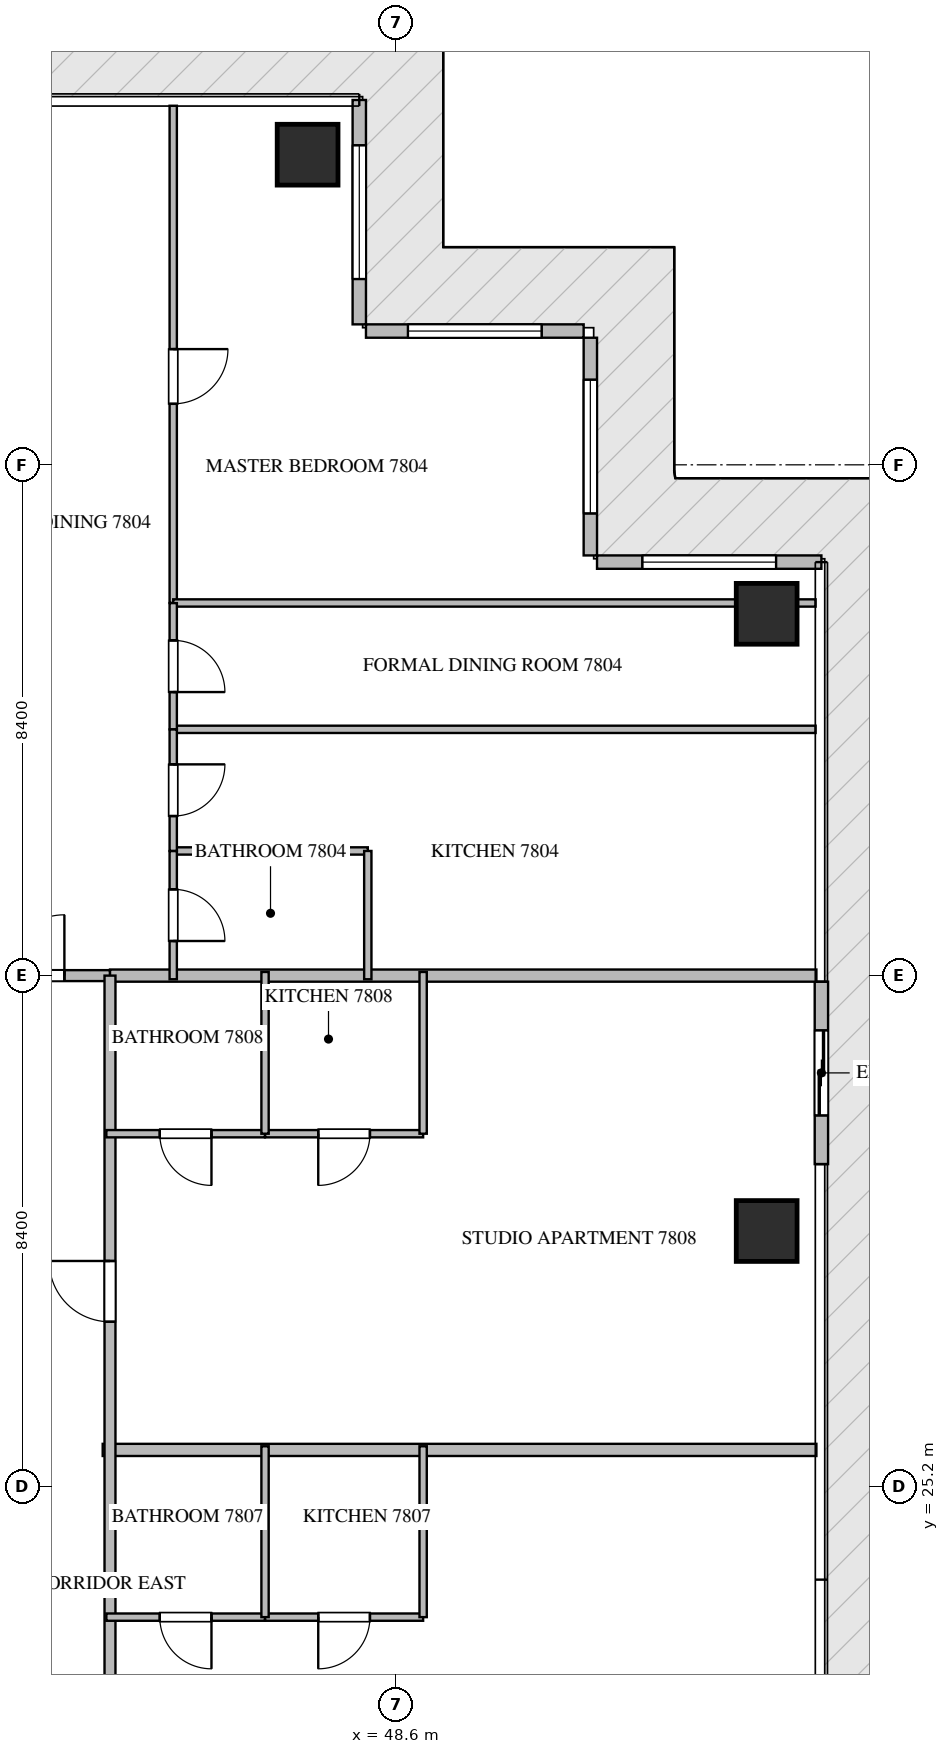
"""IFC4 building model, lengths in metres.
Left out: names, types, materials, properties, quantities, classifications, styles, units other than length and angle.
Written with IfcOpenShell. Run it as: python <this file> out.ifc"""

import sys

from ifc_helpers import new_model, si_unit, direction, frame, frame_2d, origin, origin_2d, place, context, subcontext, project, spatial, rectangle, extrude, source, transform, mapped, element, fill, save


model = new_model("IFC4")
c1 = context("Model", 3, precision=1e-05, world=origin(), true_north=direction((0.0, 1.0)))
c2 = subcontext(c1, "Body", "Model", "MODEL_VIEW")
j1 = project(units=[si_unit("LENGTHUNIT", "METRE"), si_unit("PLANEANGLEUNIT", "RADIAN")], contexts=[c1])
p1 = place(None, origin())
s1 = spatial("IfcSite", under=j1, at=p1, CompositionType="ELEMENT")
p2 = place(p1, origin())
s2 = spatial("IfcBuilding", under=s1, at=p2, CompositionType="ELEMENT")
p3 = place(p2, frame((0.0, 0.0, 313.7)))
s3 = spatial("IfcBuildingStorey", under=s2, at=p3, CompositionType="ELEMENT", Elevation=313.7)
m1 = source(origin(), c2, "Body", "SweptSolid", [
    extrude(rectangle(XDim=1.0, YDim=1.0, at=origin_2d()), origin(), (0.0, 0.0, 1.0), 4.05),
])
for number, where, z_axis, x_axis in (
    (1, (47.15, 47.1, -0.26), (0.0, 0.0, 1.0), (1.0, 0.0, 0.0)),
    (2, (54.7, 29.4, -0.26), (0.0, 0.0, 1.0), (1.0, 0.0, 0.0)),
    (3, (54.7, 39.55, -0.26), (0.0, 0.0, 1.0), (1.0, 0.0, 0.0)),
):
    element("IfcColumn", number, at=place(p3, frame(where, z_axis=z_axis, x_axis=x_axis)), inside=s3, PredefinedType="COLUMN", context=c2, shape_type="MappedRepresentation", body=[
        mapped(m1, transform((0.0, 0.0, 0.0), scale=1.0)),
    ])
p4 = place(p3, frame((55.6, 30.5, 0.0), z_axis=(0.0, 0.0, 1.0), x_axis=(0.0, 1.0, 0.0)))
e4 = element("IfcWall", 4, at=p4, inside=s3, PredefinedType="ELEMENTEDWALL", context=c2, shape_type="SweptSolid", body=[
    extrude(rectangle(XDim=3.0, YDim=0.22, at=frame_2d((1.5, 0.0))), origin(), (0.0, 0.0, 1.0), 3.775),
])
p5 = place(p4, frame((0.8, 0.0, 0.0)))
e5 = element("IfcOpeningElement", 5, at=p5, cuts=e4, PredefinedType="OPENING", context=c2, shape_type="SweptSolid", body=[
    extrude(rectangle(XDim=1.4, YDim=2.25, at=frame_2d((0.7, 1.125))), frame((0.0, 0.12, 0.0), z_axis=(0.0, -1.0, 0.0), x_axis=(1.0, 0.0, 0.0)), (0.0, 0.0, 1.0), 0.24),
])
p6 = place(p3, frame((55.6, 40.4, 0.0), z_axis=(0.0, 0.0, 1.0), x_axis=(-1.0, 0.0, 0.0)))
e6 = element("IfcWall", 6, at=p6, inside=s3, PredefinedType="ELEMENTEDWALL", context=c2, shape_type="SweptSolid", body=[
    extrude(rectangle(XDim=3.69, YDim=0.22, at=frame_2d((1.845, 0.0))), origin(), (0.0, 0.0, 1.0), 3.775),
])
p7 = place(p6, frame((0.745, 0.0, 0.65)))
e7 = element("IfcOpeningElement", 7, at=p7, cuts=e6, PredefinedType="OPENING", context=c2, shape_type="SweptSolid", body=[
    extrude(rectangle(XDim=2.2, YDim=2.4, at=frame_2d((1.1, 1.2))), frame((0.0, 0.12, 0.0), z_axis=(0.0, -1.0, 0.0), x_axis=(1.0, 0.0, 0.0)), (0.0, 0.0, 1.0), 0.24),
])
p8 = place(p3, frame((51.8, 40.51, 0.0), z_axis=(0.0, 0.0, 1.0), x_axis=(0.0, 1.0, 0.0)))
e8 = element("IfcWall", 8, at=p8, inside=s3, PredefinedType="ELEMENTEDWALL", context=c2, shape_type="SweptSolid", body=[
    extrude(rectangle(XDim=3.58, YDim=0.22, at=frame_2d((1.79, 0.0))), origin(), (0.0, 0.0, 1.0), 3.775),
])
p9 = place(p8, frame((0.69, 0.0, 0.65)))
e9 = element("IfcOpeningElement", 9, at=p9, cuts=e8, PredefinedType="OPENING", context=c2, shape_type="SweptSolid", body=[
    extrude(rectangle(XDim=2.2, YDim=2.4, at=frame_2d((1.1, 1.2))), frame((0.0, 0.12, 0.0), z_axis=(0.0, -1.0, 0.0), x_axis=(1.0, 0.0, 0.0)), (0.0, 0.0, 1.0), 0.24),
])
p10 = place(p3, frame((51.69, 44.2, 0.0), z_axis=(0.0, 0.0, 1.0), x_axis=(-1.0, 0.0, 0.0)))
e10 = element("IfcWall", 10, at=p10, inside=s3, PredefinedType="ELEMENTEDWALL", context=c2, shape_type="SweptSolid", body=[
    extrude(rectangle(XDim=3.58, YDim=0.22, at=frame_2d((1.79, 0.0))), origin(), (0.0, 0.0, 1.0), 3.775),
])
p11 = place(p10, frame((0.69, 0.0, 0.65)))
e11 = element("IfcOpeningElement", 11, at=p11, cuts=e10, PredefinedType="OPENING", context=c2, shape_type="SweptSolid", body=[
    extrude(rectangle(XDim=2.2, YDim=2.4, at=frame_2d((1.1, 1.2))), frame((0.0, 0.12, 0.0), z_axis=(0.0, -1.0, 0.0), x_axis=(1.0, 0.0, 0.0)), (0.0, 0.0, 1.0), 0.24),
])
p12 = place(p3, frame((48.0, 44.31, 0.0), z_axis=(0.0, 0.0, 1.0), x_axis=(0.0, 1.0, 0.0)))
e12 = element("IfcWall", 12, at=p12, inside=s3, PredefinedType="ELEMENTEDWALL", context=c2, shape_type="SweptSolid", body=[
    extrude(rectangle(XDim=3.69, YDim=0.22, at=frame_2d((1.845, 0.0))), origin(), (0.0, 0.0, 1.0), 3.775),
])
p13 = place(p12, frame((0.745, 0.0, 0.65)))
e13 = element("IfcOpeningElement", 13, at=p13, cuts=e12, PredefinedType="OPENING", context=c2, shape_type="SweptSolid", body=[
    extrude(rectangle(XDim=2.2, YDim=2.4, at=frame_2d((1.1, 1.2))), frame((0.0, 0.12, 0.0), z_axis=(0.0, -1.0, 0.0), x_axis=(1.0, 0.0, 0.0)), (0.0, 0.0, 1.0), 0.24),
])
p14 = place(p3, frame((43.78, 25.8, 0.0), z_axis=(0.0, 0.0, 1.0), x_axis=(1.0, 0.0, 0.0)))
e14 = element("IfcWall", 14, at=p14, inside=s3, PredefinedType="PARTITIONING", context=c2, shape_type="SweptSolid", body=[
    extrude(rectangle(XDim=11.738, YDim=0.2, at=frame_2d((5.869, 0.0))), origin(), (0.0, 0.0, 1.0), 3.79),
])
p15 = place(p3, frame((43.9, 33.6, 0.0), z_axis=(0.0, 0.0, 1.0), x_axis=(1.0, 0.0, 0.0)))
e15 = element("IfcWall", 15, at=p15, inside=s3, PredefinedType="PARTITIONING", context=c2, shape_type="SweptSolid", body=[
    extrude(rectangle(XDim=11.618, YDim=0.2, at=frame_2d((5.809, 0.0))), origin(), (0.0, 0.0, 1.0), 3.79),
])
p16 = place(p3, frame((41.402, 33.6, 0.0), z_axis=(0.0, 0.0, 1.0), x_axis=(1.0, 0.0, 0.0)))
e16 = element("IfcWall", 16, at=p16, inside=s3, PredefinedType="PARTITIONING", context=c2, shape_type="SweptSolid", body=[
    extrude(rectangle(XDim=2.496, YDim=0.18, at=frame_2d((1.248, 0.0))), origin(), (0.0, 0.0, 1.0), 3.79),
])
p17 = place(p16, frame((0.748, 0.0, 0.0)))
e17 = element("IfcOpeningElement", 17, at=p17, cuts=e16, PredefinedType="OPENING", context=c2, shape_type="SweptSolid", body=[
    extrude(rectangle(XDim=1.0, YDim=2.15, at=frame_2d((0.5, 1.075))), frame((0.0, 0.1, 0.0), z_axis=(0.0, -1.0, 0.0), x_axis=(1.0, 0.0, 0.0)), (0.0, 0.0, 1.0), 0.2),
])
p18 = place(p3, frame((43.9, 16.8, 0.0), z_axis=(0.0, 0.0, 1.0), x_axis=(0.0, 1.0, 0.0)))
e18 = element("IfcWall", 18, at=p18, inside=s3, PredefinedType="PARTITIONING", context=c2, shape_type="SweptSolid", body=[
    extrude(rectangle(XDim=16.8, YDim=0.18, at=frame_2d((8.4, 0.0))), origin(), (0.0, 0.0, 1.0), 3.79),
])
p19 = place(p18, frame((2.67, 0.0, 0.0)))
e19 = element("IfcOpeningElement", 19, at=p19, cuts=e18, PredefinedType="OPENING", context=c2, shape_type="SweptSolid", body=[
    extrude(rectangle(XDim=1.0, YDim=2.15, at=frame_2d((0.5, 1.075))), frame((0.0, 0.1, 0.0), z_axis=(0.0, -1.0, 0.0), x_axis=(1.0, 0.0, 0.0)), (0.0, 0.0, 1.0), 0.2),
])
p20 = place(p18, frame((11.107, 0.0, 0.0)))
e20 = element("IfcOpeningElement", 20, at=p20, cuts=e18, PredefinedType="OPENING", context=c2, shape_type="SweptSolid", body=[
    extrude(rectangle(XDim=1.0, YDim=2.15, at=frame_2d((0.5, 1.075))), frame((0.0, 0.1, 0.0), z_axis=(0.0, -1.0, 0.0), x_axis=(1.0, 0.0, 0.0)), (0.0, 0.0, 1.0), 0.2),
])
p21 = place(p3, frame((44.94, 47.905, 0.0), z_axis=(0.0, 0.0, 1.0), x_axis=(0.0, -1.0, 0.0)))
e21 = element("IfcWall", 21, at=p21, inside=s3, PredefinedType="PARTITIONING", context=c2, shape_type="SweptSolid", body=[
    extrude(rectangle(XDim=8.177, YDim=0.12, at=frame_2d((4.088, 0.0))), origin(), (0.0, 0.0, 1.0), 3.79),
])
p22 = place(p21, frame((4.002, 0.0, 0.0)))
e22 = element("IfcOpeningElement", 22, at=p22, cuts=e21, PredefinedType="OPENING", context=c2, shape_type="SweptSolid", body=[
    extrude(rectangle(XDim=0.9, YDim=2.1, at=frame_2d((0.45, 1.05))), frame((0.0, 0.07, 0.0), z_axis=(0.0, -1.0, 0.0), x_axis=(1.0, 0.0, 0.0)), (0.0, 0.0, 1.0), 0.14),
])
p23 = place(p3, frame((44.94, 39.728, 0.0), z_axis=(0.0, 0.0, 1.0), x_axis=(1.0, 0.0, 0.0)))
e23 = element("IfcWall", 23, at=p23, inside=s3, PredefinedType="PARTITIONING", context=c2, shape_type="SweptSolid", body=[
    extrude(rectangle(XDim=10.565, YDim=0.12, at=frame_2d((5.282, 0.0))), origin(), (0.0, 0.0, 1.0), 3.292),
])
p24 = place(p3, frame((44.94, 37.65, 0.0), z_axis=(0.0, 0.0, 1.0), x_axis=(1.0, 0.0, 0.0)))
e24 = element("IfcWall", 24, at=p24, inside=s3, PredefinedType="PARTITIONING", context=c2, shape_type="SweptSolid", body=[
    extrude(rectangle(XDim=10.565, YDim=0.12, at=frame_2d((5.282, 0.0))), origin(), (0.0, 0.0, 1.0), 3.79),
])
p25 = place(p3, frame((44.94, 35.65, 0.0), z_axis=(0.0, 0.0, 1.0), x_axis=(1.0, 0.0, 0.0)))
e25 = element("IfcWall", 25, at=p25, inside=s3, PredefinedType="PARTITIONING", context=c2, shape_type="SweptSolid", body=[
    extrude(rectangle(XDim=3.2, YDim=0.12, at=frame_2d((1.6, 0.0))), origin(), (0.0, 0.0, 1.0), 3.79),
])
p26 = place(p3, frame((48.14, 35.65, 0.0), z_axis=(0.0, 0.0, 1.0), x_axis=(0.0, -1.0, 0.0)))
e26 = element("IfcWall", 26, at=p26, inside=s3, PredefinedType="PARTITIONING", context=c2, shape_type="SweptSolid", body=[
    extrude(rectangle(XDim=2.11, YDim=0.12, at=frame_2d((1.055, 0.0))), origin(), (0.0, 0.0, 1.0), 3.79),
])
p27 = place(p3, frame((44.94, 39.726, 0.0), z_axis=(0.0, 0.0, 1.0), x_axis=(0.0, -1.0, 0.0)))
e27 = element("IfcWall", 27, at=p27, inside=s3, PredefinedType="PARTITIONING", context=c2, shape_type="SweptSolid", body=[
    extrude(rectangle(XDim=2.076, YDim=0.12, at=frame_2d((1.038, 0.0))), origin(), (0.0, 0.0, 1.0), 3.79),
])
p28 = place(p27, frame((0.613, 0.0, 0.0)))
e28 = element("IfcOpeningElement", 28, at=p28, cuts=e27, PredefinedType="OPENING", context=c2, shape_type="SweptSolid", body=[
    extrude(rectangle(XDim=0.85, YDim=2.1, at=frame_2d((0.425, 1.05))), frame((0.0, 0.07, 0.0), z_axis=(0.0, -1.0, 0.0), x_axis=(1.0, 0.0, 0.0)), (0.0, 0.0, 1.0), 0.14),
])
p29 = place(p3, frame((44.94, 37.648, 0.0), z_axis=(0.0, 0.0, 1.0), x_axis=(0.0, -1.0, 0.0)))
e29 = element("IfcWall", 29, at=p29, inside=s3, PredefinedType="PARTITIONING", context=c2, shape_type="SweptSolid", body=[
    extrude(rectangle(XDim=1.998, YDim=0.12, at=frame_2d((0.999, 0.0))), origin(), (0.0, 0.0, 1.0), 3.79),
])
p30 = place(p29, frame((0.574, 0.0, 0.0)))
e30 = element("IfcOpeningElement", 30, at=p30, cuts=e29, PredefinedType="OPENING", context=c2, shape_type="SweptSolid", body=[
    extrude(rectangle(XDim=0.85, YDim=2.1, at=frame_2d((0.425, 1.05))), frame((0.0, 0.07, 0.0), z_axis=(0.0, -1.0, 0.0), x_axis=(1.0, 0.0, 0.0)), (0.0, 0.0, 1.0), 0.14),
])
p31 = place(p3, frame((44.94, 35.648, 0.0), z_axis=(0.0, 0.0, 1.0), x_axis=(0.0, -1.0, 0.0)))
e31 = element("IfcWall", 31, at=p31, inside=s3, PredefinedType="PARTITIONING", context=c2, shape_type="SweptSolid", body=[
    extrude(rectangle(XDim=2.108, YDim=0.12, at=frame_2d((1.054, 0.0))), origin(), (0.0, 0.0, 1.0), 3.79),
])
p32 = place(p31, frame((0.629, 0.0, 0.0)))
e32 = element("IfcOpeningElement", 32, at=p32, cuts=e31, PredefinedType="OPENING", context=c2, shape_type="SweptSolid", body=[
    extrude(rectangle(XDim=0.85, YDim=2.1, at=frame_2d((0.425, 1.05))), frame((0.0, 0.07, 0.0), z_axis=(0.0, -1.0, 0.0), x_axis=(1.0, 0.0, 0.0)), (0.0, 0.0, 1.0), 0.14),
])
p33 = place(p3, frame((49.05, 23.05, 0.0), z_axis=(0.0, 0.0, 1.0), x_axis=(-1.0, 0.0, 0.0)))
e33 = element("IfcWall", 33, at=p33, inside=s3, PredefinedType="PARTITIONING", context=c2, shape_type="SweptSolid", body=[
    extrude(rectangle(XDim=2.6, YDim=0.12, at=frame_2d((1.3, 0.0))), origin(), (0.0, 0.0, 1.0), 3.79),
])
p34 = place(p33, frame((0.875, 0.0, 0.0)))
e34 = element("IfcOpeningElement", 34, at=p34, cuts=e33, PredefinedType="OPENING", context=c2, shape_type="SweptSolid", body=[
    extrude(rectangle(XDim=0.85, YDim=2.1, at=frame_2d((0.425, 1.05))), frame((0.0, 0.07, 0.0), z_axis=(0.0, -1.0, 0.0), x_axis=(1.0, 0.0, 0.0)), (0.0, 0.0, 1.0), 0.14),
])
p35 = place(p3, frame((46.448, 23.05, 0.0), z_axis=(0.0, 0.0, 1.0), x_axis=(-1.0, 0.0, 0.0)))
e35 = element("IfcWall", 35, at=p35, inside=s3, PredefinedType="PARTITIONING", context=c2, shape_type="SweptSolid", body=[
    extrude(rectangle(XDim=2.608, YDim=0.12, at=frame_2d((1.304, 0.0))), origin(), (0.0, 0.0, 1.0), 3.79),
])
p36 = place(p35, frame((0.879, 0.0, 0.0)))
e36 = element("IfcOpeningElement", 36, at=p36, cuts=e35, PredefinedType="OPENING", context=c2, shape_type="SweptSolid", body=[
    extrude(rectangle(XDim=0.85, YDim=2.1, at=frame_2d((0.425, 1.05))), frame((0.0, 0.07, 0.0), z_axis=(0.0, -1.0, 0.0), x_axis=(1.0, 0.0, 0.0)), (0.0, 0.0, 1.0), 0.14),
])
for number, where, z_axis, x_axis in (
    (37, (46.45, 23.05, 0.0), (0.0, 0.0, 1.0), (0.0, 1.0, 0.0)),
    (38, (49.05, 23.05, 0.0), (0.0, 0.0, 1.0), (0.0, 1.0, 0.0)),
):
    element("IfcWall", number, at=place(p3, frame(where, z_axis=z_axis, x_axis=x_axis)), inside=s3, PredefinedType="PARTITIONING", context=c2, shape_type="SweptSolid", body=[
        extrude(rectangle(XDim=2.81, YDim=0.12, at=frame_2d((1.405, 0.0))), origin(), (0.0, 0.0, 1.0), 3.79),
    ])
p37 = place(p3, frame((49.05, 31.0, 0.0), z_axis=(0.0, 0.0, 1.0), x_axis=(-1.0, 0.0, 0.0)))
e39 = element("IfcWall", 39, at=p37, inside=s3, PredefinedType="PARTITIONING", context=c2, shape_type="SweptSolid", body=[
    extrude(rectangle(XDim=2.6, YDim=0.12, at=frame_2d((1.3, 0.0))), origin(), (0.0, 0.0, 1.0), 3.79),
])
p38 = place(p37, frame((0.875, 0.0, 0.0)))
e40 = element("IfcOpeningElement", 40, at=p38, cuts=e39, PredefinedType="OPENING", context=c2, shape_type="SweptSolid", body=[
    extrude(rectangle(XDim=0.85, YDim=2.1, at=frame_2d((0.425, 1.05))), frame((0.0, 0.07, 0.0), z_axis=(0.0, -1.0, 0.0), x_axis=(1.0, 0.0, 0.0)), (0.0, 0.0, 1.0), 0.14),
])
p39 = place(p3, frame((46.448, 31.0, 0.0), z_axis=(0.0, 0.0, 1.0), x_axis=(-1.0, 0.0, 0.0)))
e41 = element("IfcWall", 41, at=p39, inside=s3, PredefinedType="PARTITIONING", context=c2, shape_type="SweptSolid", body=[
    extrude(rectangle(XDim=2.608, YDim=0.12, at=frame_2d((1.304, 0.0))), origin(), (0.0, 0.0, 1.0), 3.79),
])
p40 = place(p39, frame((0.879, 0.0, 0.0)))
e42 = element("IfcOpeningElement", 42, at=p40, cuts=e41, PredefinedType="OPENING", context=c2, shape_type="SweptSolid", body=[
    extrude(rectangle(XDim=0.85, YDim=2.1, at=frame_2d((0.425, 1.05))), frame((0.0, 0.07, 0.0), z_axis=(0.0, -1.0, 0.0), x_axis=(1.0, 0.0, 0.0)), (0.0, 0.0, 1.0), 0.14),
])
for number, where, z_axis, x_axis in (
    (43, (46.45, 31.0, 0.0), (0.0, 0.0, 1.0), (0.0, 1.0, 0.0)),
    (44, (49.05, 31.0, 0.0), (0.0, 0.0, 1.0), (0.0, 1.0, 0.0)),
):
    element("IfcWall", number, at=place(p3, frame(where, z_axis=z_axis, x_axis=x_axis)), inside=s3, PredefinedType="PARTITIONING", context=c2, shape_type="SweptSolid", body=[
        extrude(rectangle(XDim=2.66, YDim=0.12, at=frame_2d((1.33, 0.0))), origin(), (0.0, 0.0, 1.0), 3.79),
    ])
m2 = source(origin(), c2, "Body", "SweptSolid", [
    extrude(rectangle(XDim=1.4, YDim=2.25, at=frame_2d((0.7, 1.125))), frame((0.0, 0.025, 0.0), z_axis=(0.0, -1.0, 0.0), x_axis=(1.0, 0.0, 0.0)), (0.0, 0.0, 1.0), 0.05),
])
p41 = place(p5, origin())
e45 = element("IfcDoor", 45, at=p41, inside=s3, OperationType="SLIDING_TO_LEFT", PredefinedType="DOOR", context=c2, shape_type="MappedRepresentation", body=[
    mapped(m2, transform((0.0, 0.0, 0.0), scale=1.0)),
])
fill(e5, e45)
m3 = source(origin(), c2, "Body", "SweptSolid", [
    extrude(rectangle(XDim=2.2, YDim=2.4, at=frame_2d((1.1, 1.2))), frame((0.0, 0.03, 0.0), z_axis=(0.0, -1.0, 0.0), x_axis=(1.0, 0.0, 0.0)), (0.0, 0.0, 1.0), 0.06),
])
p42 = place(p7, origin())
e46 = element("IfcWindow", 46, at=p42, inside=s3, PartitioningType="SINGLE_PANEL", PredefinedType="WINDOW", context=c2, shape_type="MappedRepresentation", body=[
    mapped(m3, transform((0.0, 0.0, 0.0), scale=1.0)),
])
fill(e7, e46)
p43 = place(p9, origin())
e47 = element("IfcWindow", 47, at=p43, inside=s3, PartitioningType="SINGLE_PANEL", PredefinedType="WINDOW", context=c2, shape_type="MappedRepresentation", body=[
    mapped(m3, transform((0.0, 0.0, 0.0), scale=1.0)),
])
fill(e9, e47)
p44 = place(p11, origin())
e48 = element("IfcWindow", 48, at=p44, inside=s3, PartitioningType="SINGLE_PANEL", PredefinedType="WINDOW", context=c2, shape_type="MappedRepresentation", body=[
    mapped(m3, transform((0.0, 0.0, 0.0), scale=1.0)),
])
fill(e11, e48)
p45 = place(p13, origin())
e49 = element("IfcWindow", 49, at=p45, inside=s3, PartitioningType="SINGLE_PANEL", PredefinedType="WINDOW", context=c2, shape_type="MappedRepresentation", body=[
    mapped(m3, transform((0.0, 0.0, 0.0), scale=1.0)),
])
fill(e13, e49)
m4 = source(origin(), c2, "Body", "SweptSolid", [
    extrude(rectangle(XDim=1.0, YDim=2.15, at=frame_2d((0.5, 1.075))), frame((0.0, 0.025, 0.0), z_axis=(0.0, -1.0, 0.0), x_axis=(1.0, 0.0, 0.0)), (0.0, 0.0, 1.0), 0.05),
])
p46 = place(p17, origin())
e50 = element("IfcDoor", 50, at=p46, inside=s3, OperationType="SINGLE_SWING_RIGHT", PredefinedType="DOOR", context=c2, shape_type="MappedRepresentation", body=[
    mapped(m4, transform((0.0, 0.0, 0.0), scale=1.0)),
])
fill(e17, e50)
p47 = place(p20, origin())
e51 = element("IfcDoor", 51, at=p47, inside=s3, OperationType="SINGLE_SWING_RIGHT", PredefinedType="DOOR", context=c2, shape_type="MappedRepresentation", body=[
    mapped(m4, transform((0.0, 0.0, 0.0), scale=1.0)),
])
fill(e20, e51)
m5 = source(origin(), c2, "Body", "SweptSolid", [
    extrude(rectangle(XDim=0.9, YDim=2.1, at=frame_2d((0.45, 1.05))), frame((0.0, 0.025, 0.0), z_axis=(0.0, -1.0, 0.0), x_axis=(1.0, 0.0, 0.0)), (0.0, 0.0, 1.0), 0.05),
])
p48 = place(p22, origin())
e52 = element("IfcDoor", 52, at=p48, inside=s3, OperationType="SINGLE_SWING_LEFT", PredefinedType="DOOR", context=c2, shape_type="MappedRepresentation", body=[
    mapped(m5, transform((0.0, 0.0, 0.0), scale=1.0)),
])
fill(e22, e52)
m6 = source(origin(), c2, "Body", "SweptSolid", [
    extrude(rectangle(XDim=0.85, YDim=2.1, at=frame_2d((0.425, 1.05))), frame((0.0, 0.025, 0.0), z_axis=(0.0, -1.0, 0.0), x_axis=(1.0, 0.0, 0.0)), (0.0, 0.0, 1.0), 0.05),
])
p49 = place(p28, origin())
e53 = element("IfcDoor", 53, at=p49, inside=s3, OperationType="SINGLE_SWING_RIGHT", PredefinedType="DOOR", context=c2, shape_type="MappedRepresentation", body=[
    mapped(m6, transform((0.0, 0.0, 0.0), scale=1.0)),
])
fill(e28, e53)
p50 = place(p30, origin())
e54 = element("IfcDoor", 54, at=p50, inside=s3, OperationType="SINGLE_SWING_LEFT", PredefinedType="DOOR", context=c2, shape_type="MappedRepresentation", body=[
    mapped(m6, transform((0.0, 0.0, 0.0), scale=1.0)),
])
fill(e30, e54)
p51 = place(p32, origin())
e55 = element("IfcDoor", 55, at=p51, inside=s3, OperationType="SINGLE_SWING_RIGHT", PredefinedType="DOOR", context=c2, shape_type="MappedRepresentation", body=[
    mapped(m6, transform((0.0, 0.0, 0.0), scale=1.0)),
])
fill(e32, e55)
p52 = place(p34, origin())
e56 = element("IfcDoor", 56, at=p52, inside=s3, OperationType="SINGLE_SWING_RIGHT", PredefinedType="DOOR", context=c2, shape_type="MappedRepresentation", body=[
    mapped(m6, transform((0.0, 0.0, 0.0), scale=1.0)),
])
fill(e34, e56)
p53 = place(p36, origin())
e57 = element("IfcDoor", 57, at=p53, inside=s3, OperationType="SINGLE_SWING_LEFT", PredefinedType="DOOR", context=c2, shape_type="MappedRepresentation", body=[
    mapped(m6, transform((0.0, 0.0, 0.0), scale=1.0)),
])
fill(e36, e57)
p54 = place(p38, origin())
e58 = element("IfcDoor", 58, at=p54, inside=s3, OperationType="SINGLE_SWING_RIGHT", PredefinedType="DOOR", context=c2, shape_type="MappedRepresentation", body=[
    mapped(m6, transform((0.0, 0.0, 0.0), scale=1.0)),
])
fill(e40, e58)
p55 = place(p40, origin())
e59 = element("IfcDoor", 59, at=p55, inside=s3, OperationType="SINGLE_SWING_LEFT", PredefinedType="DOOR", context=c2, shape_type="MappedRepresentation", body=[
    mapped(m6, transform((0.0, 0.0, 0.0), scale=1.0)),
])
fill(e42, e59)
save(model, sys.argv[1])
